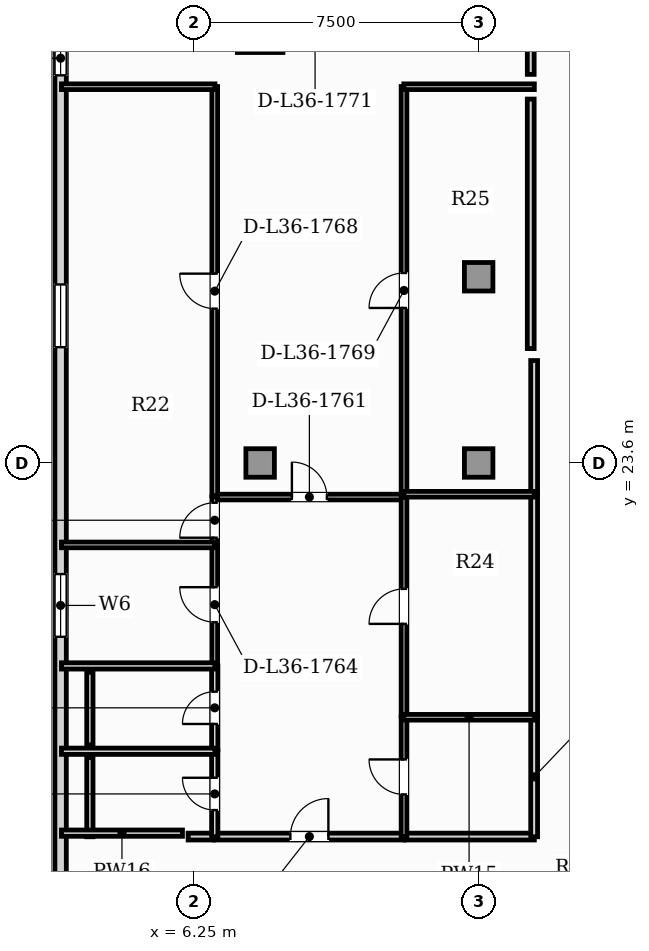
"""IFC4 building model, lengths in metres.
Left out: names, types, materials, properties, quantities, classifications, styles, units other than length and angle.
Written with IfcOpenShell. Run it as: python <this file> out.ifc"""

import sys

from ifc_helpers import new_model, si_unit, direction, frame, frame_2d, origin, origin_2d, place, context, subcontext, project, spatial, rectangle, hollow_rectangle, extrude, element, fill, save


model = new_model("IFC4")
c1 = context("Model", 3, precision=1e-05, world=origin(), true_north=direction((0.0, 1.0)))
c2 = subcontext(c1, "Body", "Model", "MODEL_VIEW")
j1 = project(units=[si_unit("LENGTHUNIT", "METRE"), si_unit("PLANEANGLEUNIT", "RADIAN")], contexts=[c1])
p1 = place(None, origin())
s1 = spatial("IfcSite", under=j1, at=p1, CompositionType="ELEMENT")
p2 = place(p1, origin())
s2 = spatial("IfcBuilding", under=s1, at=p2, CompositionType="ELEMENT")
p3 = place(p2, frame((0.0, 0.0, 149.05)))
s3 = spatial("IfcBuildingStorey", under=s2, at=p3, CompositionType="ELEMENT", Elevation=149.05)
p4 = place(p3, frame((8.0, 35.0, 0.0), z_axis=(0.0, 0.0, 1.0), x_axis=(1.0, 0.0, 0.0)))
e1 = element("IfcColumn", 1, at=p4, inside=s3, PredefinedType="USERDEFINED", context=c2, shape_type="SweptSolid", body=[
    extrude(hollow_rectangle(XDim=1.2, YDim=1.2, WallThickness=0.07, at=origin_2d()), origin(), (0.0, 0.0, 1.0), 3.85),
])
for number, where, z_axis, x_axis in (
    (2, (8.0, 23.6, 0.0), (0.0, 0.0, 1.0), (1.0, 0.0, 0.0)),
    (3, (13.75, 23.6, 0.0), (0.0, 0.0, 1.0), (1.0, 0.0, 0.0)),
    (4, (13.75, 28.5, 0.0), (0.0, 0.0, 1.0), (1.0, 0.0, 0.0)),
):
    element("IfcColumn", number, at=place(p3, frame(where, z_axis=z_axis, x_axis=x_axis)), inside=s3, PredefinedType="COLUMN", context=c2, shape_type="SweptSolid", body=[
        extrude(rectangle(XDim=0.75, YDim=0.75, at=origin_2d()), origin(), (0.0, 0.0, 1.0), 3.85),
    ])
p5 = place(p3, frame((2.75, 39.96, 0.0), z_axis=(0.0, 0.0, 1.0), x_axis=(0.0, -1.0, 0.0)))
e5 = element("IfcWall", 5, at=p5, inside=s3, PredefinedType="SOLIDWALL", context=c2, shape_type="SweptSolid", body=[
    extrude(rectangle(XDim=36.72, YDim=0.3, at=frame_2d((18.36, 0.0))), origin(), (0.0, 0.0, 1.0), 3.63),
])
p6 = place(p5, frame((5.26, 0.0, 0.95)))
e6 = element("IfcOpeningElement", 6, at=p6, cuts=e5, PredefinedType="OPENING", context=c2, shape_type="SweptSolid", body=[
    extrude(rectangle(XDim=0.9, YDim=1.5, at=frame_2d((0.45, 0.75))), frame((0.0, 0.16, 0.0), z_axis=(0.0, -1.0, 0.0), x_axis=(1.0, 0.0, 0.0)), (0.0, 0.0, 1.0), 0.32),
])
p7 = place(p5, frame((19.283, 0.0, 0.88)))
e7 = element("IfcOpeningElement", 7, at=p7, cuts=e5, PredefinedType="OPENING", context=c2, shape_type="SweptSolid", body=[
    extrude(rectangle(XDim=1.65, YDim=2.0, at=frame_2d((0.825, 1.0))), frame((0.0, 0.16, 0.0), z_axis=(0.0, -1.0, 0.0), x_axis=(1.0, 0.0, 0.0)), (0.0, 0.0, 1.0), 0.32),
])
p8 = place(p5, frame((11.663, 0.0, 0.88)))
e8 = element("IfcOpeningElement", 8, at=p8, cuts=e5, PredefinedType="OPENING", context=c2, shape_type="SweptSolid", body=[
    extrude(rectangle(XDim=1.65, YDim=2.0, at=frame_2d((0.825, 1.0))), frame((0.0, 0.16, 0.0), z_axis=(0.0, -1.0, 0.0), x_axis=(1.0, 0.0, 0.0)), (0.0, 0.0, 1.0), 0.32),
])
p9 = place(p3, frame((6.801, 13.77, 0.0), z_axis=(0.0, 0.0, 1.0), x_axis=(1.0, 0.0, 0.0)))
e9 = element("IfcWall", 9, at=p9, inside=s3, PredefinedType="PARTITIONING", context=c2, shape_type="SweptSolid", body=[
    extrude(rectangle(XDim=4.99, YDim=0.18, at=frame_2d((2.495, 0.0))), origin(), (0.0, 0.0, 1.0), 3.63),
])
p10 = place(p9, frame((1.995, 0.0, 0.0)))
e10 = element("IfcOpeningElement", 10, at=p10, cuts=e9, PredefinedType="OPENING", context=c2, shape_type="SweptSolid", body=[
    extrude(rectangle(XDim=1.0, YDim=2.15, at=frame_2d((0.5, 1.075))), frame((0.0, 0.1, 0.0), z_axis=(0.0, -1.0, 0.0), x_axis=(1.0, 0.0, 0.0)), (0.0, 0.0, 1.0), 0.2),
])
p11 = place(p3, frame((6.105, 13.77, 0.0), z_axis=(0.0, 0.0, 1.0), x_axis=(1.0, 0.0, 0.0)))
e11 = element("IfcWall", 11, at=p11, inside=s3, PredefinedType="PARTITIONING", context=c2, shape_type="SweptSolid", body=[
    extrude(rectangle(XDim=0.666, YDim=0.18, at=frame_2d((0.333, 0.0))), origin(), (0.0, 0.0, 1.0), 3.63),
])
p12 = place(p3, frame((11.821, 13.77, 0.0), z_axis=(0.0, 0.0, 1.0), x_axis=(1.0, 0.0, 0.0)))
e12 = element("IfcWall", 12, at=p12, inside=s3, PredefinedType="PARTITIONING", context=c2, shape_type="SweptSolid", body=[
    extrude(rectangle(XDim=3.394, YDim=0.18, at=frame_2d((1.697, 0.0))), origin(), (0.0, 0.0, 1.0), 3.63),
])
p13 = place(p3, frame((15.21, 13.765, 0.0), z_axis=(0.0, 0.0, 1.0), x_axis=(0.0, 1.0, 0.0)))
e13 = element("IfcWall", 13, at=p13, inside=s3, PredefinedType="PARTITIONING", context=c2, shape_type="SweptSolid", body=[
    extrude(rectangle(XDim=3.149, YDim=0.18, at=frame_2d((1.575, 0.0))), origin(), (0.0, 0.0, 1.0), 3.63),
])
p14 = place(p3, frame((15.21, 16.944, 0.0), z_axis=(0.0, 0.0, 1.0), x_axis=(0.0, 1.0, 0.0)))
e14 = element("IfcWall", 14, at=p14, inside=s3, PredefinedType="PARTITIONING", context=c2, shape_type="SweptSolid", body=[
    extrude(rectangle(XDim=5.838, YDim=0.18, at=frame_2d((2.919, 0.0))), origin(), (0.0, 0.0, 1.0), 3.63),
])
p15 = place(p3, frame((15.21, 22.812, 0.0), z_axis=(0.0, 0.0, 1.0), x_axis=(0.0, 1.0, 0.0)))
e15 = element("IfcWall", 15, at=p15, inside=s3, PredefinedType="PARTITIONING", context=c2, shape_type="SweptSolid", body=[
    extrude(rectangle(XDim=3.482, YDim=0.18, at=frame_2d((1.741, 0.0))), origin(), (0.0, 0.0, 1.0), 3.63),
])
p16 = place(p3, frame((6.801, 22.703, 0.0), z_axis=(0.0, 0.0, 1.0), x_axis=(1.0, 0.0, 0.0)))
e16 = element("IfcWall", 16, at=p16, inside=s3, PredefinedType="PARTITIONING", context=c2, shape_type="SweptSolid", body=[
    extrude(rectangle(XDim=4.99, YDim=0.15, at=frame_2d((2.495, 0.0))), origin(), (0.0, 0.0, 1.0), 3.63),
])
p17 = place(p16, frame((2.035, 0.0, 0.0)))
e17 = element("IfcOpeningElement", 17, at=p17, cuts=e16, PredefinedType="OPENING", context=c2, shape_type="SweptSolid", body=[
    extrude(rectangle(XDim=0.92, YDim=2.1, at=frame_2d((0.46, 1.05))), frame((0.0, 0.085, 0.0), z_axis=(0.0, -1.0, 0.0), x_axis=(1.0, 0.0, 0.0)), (0.0, 0.0, 1.0), 0.17),
])
p18 = place(p3, frame((6.806, 13.765, 0.0), z_axis=(0.0, 0.0, 1.0), x_axis=(0.0, 1.0, 0.0)))
e18 = element("IfcWall", 18, at=p18, inside=s3, PredefinedType="PLUMBINGWALL", context=c2, shape_type="SweptSolid", body=[
    extrude(rectangle(XDim=2.255, YDim=0.165, at=frame_2d((1.127, 0.0))), origin(), (0.0, 0.0, 1.0), 3.63),
])
p19 = place(p18, frame((0.702, 0.0, 0.0)))
e19 = element("IfcOpeningElement", 19, at=p19, cuts=e18, PredefinedType="OPENING", context=c2, shape_type="SweptSolid", body=[
    extrude(rectangle(XDim=0.85, YDim=2.1, at=frame_2d((0.425, 1.05))), frame((0.0, 0.093, 0.0), z_axis=(0.0, -1.0, 0.0), x_axis=(1.0, 0.0, 0.0)), (0.0, 0.0, 1.0), 0.185),
])
p20 = place(p3, frame((6.806, 16.05, 0.0), z_axis=(0.0, 0.0, 1.0), x_axis=(0.0, 1.0, 0.0)))
e20 = element("IfcWall", 20, at=p20, inside=s3, PredefinedType="PLUMBINGWALL", context=c2, shape_type="SweptSolid", body=[
    extrude(rectangle(XDim=2.215, YDim=0.165, at=frame_2d((1.107, 0.0))), origin(), (0.0, 0.0, 1.0), 3.63),
])
p21 = place(p20, frame((0.683, 0.0, 0.0)))
e21 = element("IfcOpeningElement", 21, at=p21, cuts=e20, PredefinedType="OPENING", context=c2, shape_type="SweptSolid", body=[
    extrude(rectangle(XDim=0.85, YDim=2.1, at=frame_2d((0.425, 1.05))), frame((0.0, 0.093, 0.0), z_axis=(0.0, -1.0, 0.0), x_axis=(1.0, 0.0, 0.0)), (0.0, 0.0, 1.0), 0.185),
])
p22 = place(p3, frame((6.806, 18.295, 0.0), z_axis=(0.0, 0.0, 1.0), x_axis=(0.0, 1.0, 0.0)))
e22 = element("IfcWall", 22, at=p22, inside=s3, PredefinedType="PARTITIONING", context=c2, shape_type="SweptSolid", body=[
    extrude(rectangle(XDim=3.154, YDim=0.15, at=frame_2d((1.577, 0.0))), origin(), (0.0, 0.0, 1.0), 3.63),
])
p23 = place(p22, frame((1.117, 0.0, 0.0)))
e23 = element("IfcOpeningElement", 23, at=p23, cuts=e22, PredefinedType="OPENING", context=c2, shape_type="SweptSolid", body=[
    extrude(rectangle(XDim=0.92, YDim=2.1, at=frame_2d((0.46, 1.05))), frame((0.0, 0.085, 0.0), z_axis=(0.0, -1.0, 0.0), x_axis=(1.0, 0.0, 0.0)), (0.0, 0.0, 1.0), 0.17),
])
p24 = place(p3, frame((6.806, 21.479, 0.0), z_axis=(0.0, 0.0, 1.0), x_axis=(0.0, 1.0, 0.0)))
e24 = element("IfcWall", 24, at=p24, inside=s3, PredefinedType="PARTITIONING", context=c2, shape_type="SweptSolid", body=[
    extrude(rectangle(XDim=1.229, YDim=0.15, at=frame_2d((0.615, 0.0))), origin(), (0.0, 0.0, 1.0), 3.63),
])
p25 = place(p24, frame((0.155, 0.0, 0.0)))
e25 = element("IfcOpeningElement", 25, at=p25, cuts=e24, PredefinedType="OPENING", context=c2, shape_type="SweptSolid", body=[
    extrude(rectangle(XDim=0.92, YDim=2.1, at=frame_2d((0.46, 1.05))), frame((0.0, 0.085, 0.0), z_axis=(0.0, -1.0, 0.0), x_axis=(1.0, 0.0, 0.0)), (0.0, 0.0, 1.0), 0.17),
])
p26 = place(p3, frame((11.786, 13.765, 0.0), z_axis=(0.0, 0.0, 1.0), x_axis=(0.0, 1.0, 0.0)))
e26 = element("IfcWall", 26, at=p26, inside=s3, PredefinedType="PARTITIONING", context=c2, shape_type="SweptSolid", body=[
    extrude(rectangle(XDim=3.149, YDim=0.15, at=frame_2d((1.575, 0.0))), origin(), (0.0, 0.0, 1.0), 3.63),
])
p27 = place(p26, frame((1.115, 0.0, 0.0)))
e27 = element("IfcOpeningElement", 27, at=p27, cuts=e26, PredefinedType="OPENING", context=c2, shape_type="SweptSolid", body=[
    extrude(rectangle(XDim=0.92, YDim=2.1, at=frame_2d((0.46, 1.05))), frame((0.0, 0.085, 0.0), z_axis=(0.0, -1.0, 0.0), x_axis=(1.0, 0.0, 0.0)), (0.0, 0.0, 1.0), 0.17),
])
p28 = place(p3, frame((11.786, 16.944, 0.0), z_axis=(0.0, 0.0, 1.0), x_axis=(0.0, 1.0, 0.0)))
e28 = element("IfcWall", 28, at=p28, inside=s3, PredefinedType="PARTITIONING", context=c2, shape_type="SweptSolid", body=[
    extrude(rectangle(XDim=5.764, YDim=0.15, at=frame_2d((2.882, 0.0))), origin(), (0.0, 0.0, 1.0), 3.63),
])
p29 = place(p28, frame((2.422, 0.0, 0.0)))
e29 = element("IfcOpeningElement", 29, at=p29, cuts=e28, PredefinedType="OPENING", context=c2, shape_type="SweptSolid", body=[
    extrude(rectangle(XDim=0.92, YDim=2.1, at=frame_2d((0.46, 1.05))), frame((0.0, 0.085, 0.0), z_axis=(0.0, -1.0, 0.0), x_axis=(1.0, 0.0, 0.0)), (0.0, 0.0, 1.0), 0.17),
])
p30 = place(p3, frame((6.806, 22.738, 0.0), z_axis=(0.0, 0.0, 1.0), x_axis=(0.0, 1.0, 0.0)))
e30 = element("IfcWall", 30, at=p30, inside=s3, PredefinedType="PARTITIONING", context=c2, shape_type="SweptSolid", body=[
    extrude(rectangle(XDim=10.767, YDim=0.15, at=frame_2d((5.383, 0.0))), origin(), (0.0, 0.0, 1.0), 3.63),
])
p31 = place(p30, frame((4.923, 0.0, 0.0)))
e31 = element("IfcOpeningElement", 31, at=p31, cuts=e30, PredefinedType="OPENING", context=c2, shape_type="SweptSolid", body=[
    extrude(rectangle(XDim=0.92, YDim=2.1, at=frame_2d((0.46, 1.05))), frame((0.0, 0.085, 0.0), z_axis=(0.0, -1.0, 0.0), x_axis=(1.0, 0.0, 0.0)), (0.0, 0.0, 1.0), 0.17),
])
p32 = place(p3, frame((2.772, 33.5, 0.0), z_axis=(0.0, 0.0, 1.0), x_axis=(1.0, 0.0, 0.0)))
e32 = element("IfcWall", 32, at=p32, inside=s3, PredefinedType="PARTITIONING", context=c2, shape_type="SweptSolid", body=[
    extrude(rectangle(XDim=4.038, YDim=0.15, at=frame_2d((2.019, 0.0))), origin(), (0.0, 0.0, 1.0), 3.63),
])
p33 = place(p3, frame((11.786, 22.772, 0.0), z_axis=(0.0, 0.0, 1.0), x_axis=(0.0, 1.0, 0.0)))
e33 = element("IfcWall", 33, at=p33, inside=s3, PredefinedType="PARTITIONING", context=c2, shape_type="SweptSolid", body=[
    extrude(rectangle(XDim=10.732, YDim=0.15, at=frame_2d((5.366, 0.0))), origin(), (0.0, 0.0, 1.0), 3.63),
])
p34 = place(p33, frame((4.906, 0.0, 0.0)))
e34 = element("IfcOpeningElement", 34, at=p34, cuts=e33, PredefinedType="OPENING", context=c2, shape_type="SweptSolid", body=[
    extrude(rectangle(XDim=0.92, YDim=2.1, at=frame_2d((0.46, 1.05))), frame((0.0, 0.085, 0.0), z_axis=(0.0, -1.0, 0.0), x_axis=(1.0, 0.0, 0.0)), (0.0, 0.0, 1.0), 0.17),
])
p35 = place(p3, frame((11.781, 33.5, 0.0), z_axis=(0.0, 0.0, 1.0), x_axis=(1.0, 0.0, 0.0)))
e35 = element("IfcWall", 35, at=p35, inside=s3, PredefinedType="PARTITIONING", context=c2, shape_type="SweptSolid", body=[
    extrude(rectangle(XDim=3.434, YDim=0.15, at=frame_2d((1.717, 0.0))), origin(), (0.0, 0.0, 1.0), 3.63),
])
for number, where, z_axis, x_axis in (
    (36, (2.772, 16.015, 0.0), (0.0, 0.0, 1.0), (1.0, 0.0, 0.0)),
    (37, (2.772, 18.26, 0.0), (0.0, 0.0, 1.0), (1.0, 0.0, 0.0)),
):
    element("IfcWall", number, at=place(p3, frame(where, z_axis=z_axis, x_axis=x_axis)), inside=s3, PredefinedType="PLUMBINGWALL", context=c2, shape_type="SweptSolid", body=[
        extrude(rectangle(XDim=4.038, YDim=0.165, at=frame_2d((2.019, 0.0))), origin(), (0.0, 0.0, 1.0), 3.63),
    ])
p36 = place(p3, frame((2.772, 21.444, 0.0), z_axis=(0.0, 0.0, 1.0), x_axis=(1.0, 0.0, 0.0)))
e38 = element("IfcWall", 38, at=p36, inside=s3, PredefinedType="PARTITIONING", context=c2, shape_type="SweptSolid", body=[
    extrude(rectangle(XDim=4.038, YDim=0.15, at=frame_2d((2.019, 0.0))), origin(), (0.0, 0.0, 1.0), 3.63),
])
for number, where, z_axis, x_axis in (
    (39, (11.781, 16.909, 0.0), (0.0, 0.0, 1.0), (1.0, 0.0, 0.0)),
    (40, (11.781, 22.777, 0.0), (0.0, 0.0, 1.0), (1.0, 0.0, 0.0)),
):
    element("IfcWall", number, at=place(p3, frame(where, z_axis=z_axis, x_axis=x_axis)), inside=s3, PredefinedType="PARTITIONING", context=c2, shape_type="SweptSolid", body=[
        extrude(rectangle(XDim=3.434, YDim=0.15, at=frame_2d((1.717, 0.0))), origin(), (0.0, 0.0, 1.0), 3.63),
    ])
p37 = place(p3, frame((15.12, 34.675, 0.0), z_axis=(0.0, 0.0, 1.0), x_axis=(0.0, -1.0, 0.0)))
e41 = element("IfcWall", 41, at=p37, inside=s3, PredefinedType="PARTITIONING", context=c2, shape_type="SweptSolid", body=[
    extrude(rectangle(XDim=0.85, YDim=0.18, at=frame_2d((0.425, 0.0))), origin(), (0.0, 0.0, 1.0), 3.63),
])
p38 = place(p3, frame((3.52, 13.765, 0.0), z_axis=(0.0, 0.0, 1.0), x_axis=(0.0, 1.0, 0.0)))
e42 = element("IfcWall", 42, at=p38, inside=s3, PredefinedType="PLUMBINGWALL", context=c2, shape_type="SweptSolid", body=[
    extrude(rectangle(XDim=2.085, YDim=0.165, at=frame_2d((1.042, 0.0))), origin(), (0.0, 0.0, 1.0), 3.63),
])
p39 = place(p3, frame((5.956, 13.86, 0.0), z_axis=(0.0, 0.0, 1.0), x_axis=(-1.0, 0.0, 0.0)))
e43 = element("IfcWall", 43, at=p39, inside=s3, PredefinedType="PLUMBINGWALL", context=c2, shape_type="SweptSolid", body=[
    extrude(rectangle(XDim=3.184, YDim=0.165, at=frame_2d((1.592, 0.0))), origin(), (0.0, 0.0, 1.0), 3.63),
])
p40 = place(p3, frame((3.52, 16.18, 0.0), z_axis=(0.0, 0.0, 1.0), x_axis=(0.0, 1.0, 0.0)))
e44 = element("IfcWall", 44, at=p40, inside=s3, PredefinedType="PLUMBINGWALL", context=c2, shape_type="SweptSolid", body=[
    extrude(rectangle(XDim=1.915, YDim=0.165, at=frame_2d((0.958, 0.0))), origin(), (0.0, 0.0, 1.0), 3.63),
])
p41 = place(p3, frame((15.12, 33.175, 0.0), z_axis=(0.0, 0.0, 1.0), x_axis=(0.0, -1.0, 0.0)))
e45 = element("IfcWall", 45, at=p41, inside=s3, PredefinedType="PARTITIONING", context=c2, shape_type="SweptSolid", body=[
    extrude(rectangle(XDim=6.565, YDim=0.18, at=frame_2d((3.283, 0.0))), origin(), (0.0, 0.0, 1.0), 3.63),
])
p42 = place(p6, origin())
e46 = element("IfcWindow", 46, at=p42, inside=s3, PartitioningType="SINGLE_PANEL", PredefinedType="WINDOW", context=c2, shape_type="SweptSolid", body=[
    extrude(rectangle(XDim=0.9, YDim=1.5, at=frame_2d((0.45, 0.75))), frame((0.0, 0.03, 0.0), z_axis=(0.0, -1.0, 0.0), x_axis=(1.0, 0.0, 0.0)), (0.0, 0.0, 1.0), 0.06),
])
fill(e6, e46)
p43 = place(p7, origin())
e47 = element("IfcWindow", 47, at=p43, inside=s3, PartitioningType="SINGLE_PANEL", PredefinedType="WINDOW", context=c2, shape_type="SweptSolid", body=[
    extrude(rectangle(XDim=1.65, YDim=2.0, at=frame_2d((0.825, 1.0))), frame((0.0, 0.03, 0.0), z_axis=(0.0, -1.0, 0.0), x_axis=(1.0, 0.0, 0.0)), (0.0, 0.0, 1.0), 0.06),
])
fill(e7, e47)
p44 = place(p8, origin())
e48 = element("IfcWindow", 48, at=p44, inside=s3, PartitioningType="SINGLE_PANEL", PredefinedType="WINDOW", context=c2, shape_type="SweptSolid", body=[
    extrude(rectangle(XDim=1.65, YDim=2.0, at=frame_2d((0.825, 1.0))), frame((0.0, 0.03, 0.0), z_axis=(0.0, -1.0, 0.0), x_axis=(1.0, 0.0, 0.0)), (0.0, 0.0, 1.0), 0.06),
])
fill(e8, e48)
p45 = place(p10, origin())
e49 = element("IfcDoor", 49, at=p45, inside=s3, OperationType="SINGLE_SWING_RIGHT", PredefinedType="DOOR", context=c2, shape_type="SweptSolid", body=[
    extrude(rectangle(XDim=1.0, YDim=2.15, at=frame_2d((0.5, 1.075))), frame((0.0, 0.025, 0.0), z_axis=(0.0, -1.0, 0.0), x_axis=(1.0, 0.0, 0.0)), (0.0, 0.0, 1.0), 0.05),
])
fill(e10, e49)
p46 = place(p17, origin())
e50 = element("IfcDoor", 50, at=p46, inside=s3, OperationType="SINGLE_SWING_LEFT", PredefinedType="DOOR", context=c2, shape_type="SweptSolid", body=[
    extrude(rectangle(XDim=0.92, YDim=2.1, at=frame_2d((0.46, 1.05))), frame((0.0, 0.025, 0.0), z_axis=(0.0, -1.0, 0.0), x_axis=(1.0, 0.0, 0.0)), (0.0, 0.0, 1.0), 0.05),
])
fill(e17, e50)
p47 = place(p19, origin())
e51 = element("IfcDoor", 51, at=p47, inside=s3, OperationType="SINGLE_SWING_RIGHT", PredefinedType="DOOR", context=c2, shape_type="SweptSolid", body=[
    extrude(rectangle(XDim=0.85, YDim=2.1, at=frame_2d((0.425, 1.05))), frame((0.0, 0.025, 0.0), z_axis=(0.0, -1.0, 0.0), x_axis=(1.0, 0.0, 0.0)), (0.0, 0.0, 1.0), 0.05),
])
fill(e19, e51)
p48 = place(p21, origin())
e52 = element("IfcDoor", 52, at=p48, inside=s3, OperationType="SINGLE_SWING_LEFT", PredefinedType="DOOR", context=c2, shape_type="SweptSolid", body=[
    extrude(rectangle(XDim=0.85, YDim=2.1, at=frame_2d((0.425, 1.05))), frame((0.0, 0.025, 0.0), z_axis=(0.0, -1.0, 0.0), x_axis=(1.0, 0.0, 0.0)), (0.0, 0.0, 1.0), 0.05),
])
fill(e21, e52)
p49 = place(p23, origin())
e53 = element("IfcDoor", 53, at=p49, inside=s3, OperationType="SINGLE_SWING_RIGHT", PredefinedType="DOOR", context=c2, shape_type="SweptSolid", body=[
    extrude(rectangle(XDim=0.92, YDim=2.1, at=frame_2d((0.46, 1.05))), frame((0.0, 0.025, 0.0), z_axis=(0.0, -1.0, 0.0), x_axis=(1.0, 0.0, 0.0)), (0.0, 0.0, 1.0), 0.05),
])
fill(e23, e53)
p50 = place(p25, origin())
e54 = element("IfcDoor", 54, at=p50, inside=s3, OperationType="SINGLE_SWING_LEFT", PredefinedType="DOOR", context=c2, shape_type="SweptSolid", body=[
    extrude(rectangle(XDim=0.92, YDim=2.1, at=frame_2d((0.46, 1.05))), frame((0.0, 0.025, 0.0), z_axis=(0.0, -1.0, 0.0), x_axis=(1.0, 0.0, 0.0)), (0.0, 0.0, 1.0), 0.05),
])
fill(e25, e54)
p51 = place(p27, origin())
e55 = element("IfcDoor", 55, at=p51, inside=s3, OperationType="SINGLE_SWING_RIGHT", PredefinedType="DOOR", context=c2, shape_type="SweptSolid", body=[
    extrude(rectangle(XDim=0.92, YDim=2.1, at=frame_2d((0.46, 1.05))), frame((0.0, 0.025, 0.0), z_axis=(0.0, -1.0, 0.0), x_axis=(1.0, 0.0, 0.0)), (0.0, 0.0, 1.0), 0.05),
])
fill(e27, e55)
p52 = place(p29, origin())
e56 = element("IfcDoor", 56, at=p52, inside=s3, OperationType="SINGLE_SWING_LEFT", PredefinedType="DOOR", context=c2, shape_type="SweptSolid", body=[
    extrude(rectangle(XDim=0.92, YDim=2.1, at=frame_2d((0.46, 1.05))), frame((0.0, 0.025, 0.0), z_axis=(0.0, -1.0, 0.0), x_axis=(1.0, 0.0, 0.0)), (0.0, 0.0, 1.0), 0.05),
])
fill(e29, e56)
p53 = place(p31, origin())
e57 = element("IfcDoor", 57, at=p53, inside=s3, OperationType="SINGLE_SWING_RIGHT", PredefinedType="DOOR", context=c2, shape_type="SweptSolid", body=[
    extrude(rectangle(XDim=0.92, YDim=2.1, at=frame_2d((0.46, 1.05))), frame((0.0, 0.025, 0.0), z_axis=(0.0, -1.0, 0.0), x_axis=(1.0, 0.0, 0.0)), (0.0, 0.0, 1.0), 0.05),
])
fill(e31, e57)
p54 = place(p34, origin())
e58 = element("IfcDoor", 58, at=p54, inside=s3, OperationType="SINGLE_SWING_LEFT", PredefinedType="DOOR", context=c2, shape_type="SweptSolid", body=[
    extrude(rectangle(XDim=0.92, YDim=2.1, at=frame_2d((0.46, 1.05))), frame((0.0, 0.025, 0.0), z_axis=(0.0, -1.0, 0.0), x_axis=(1.0, 0.0, 0.0)), (0.0, 0.0, 1.0), 0.05),
])
fill(e34, e58)
save(model, sys.argv[1])
